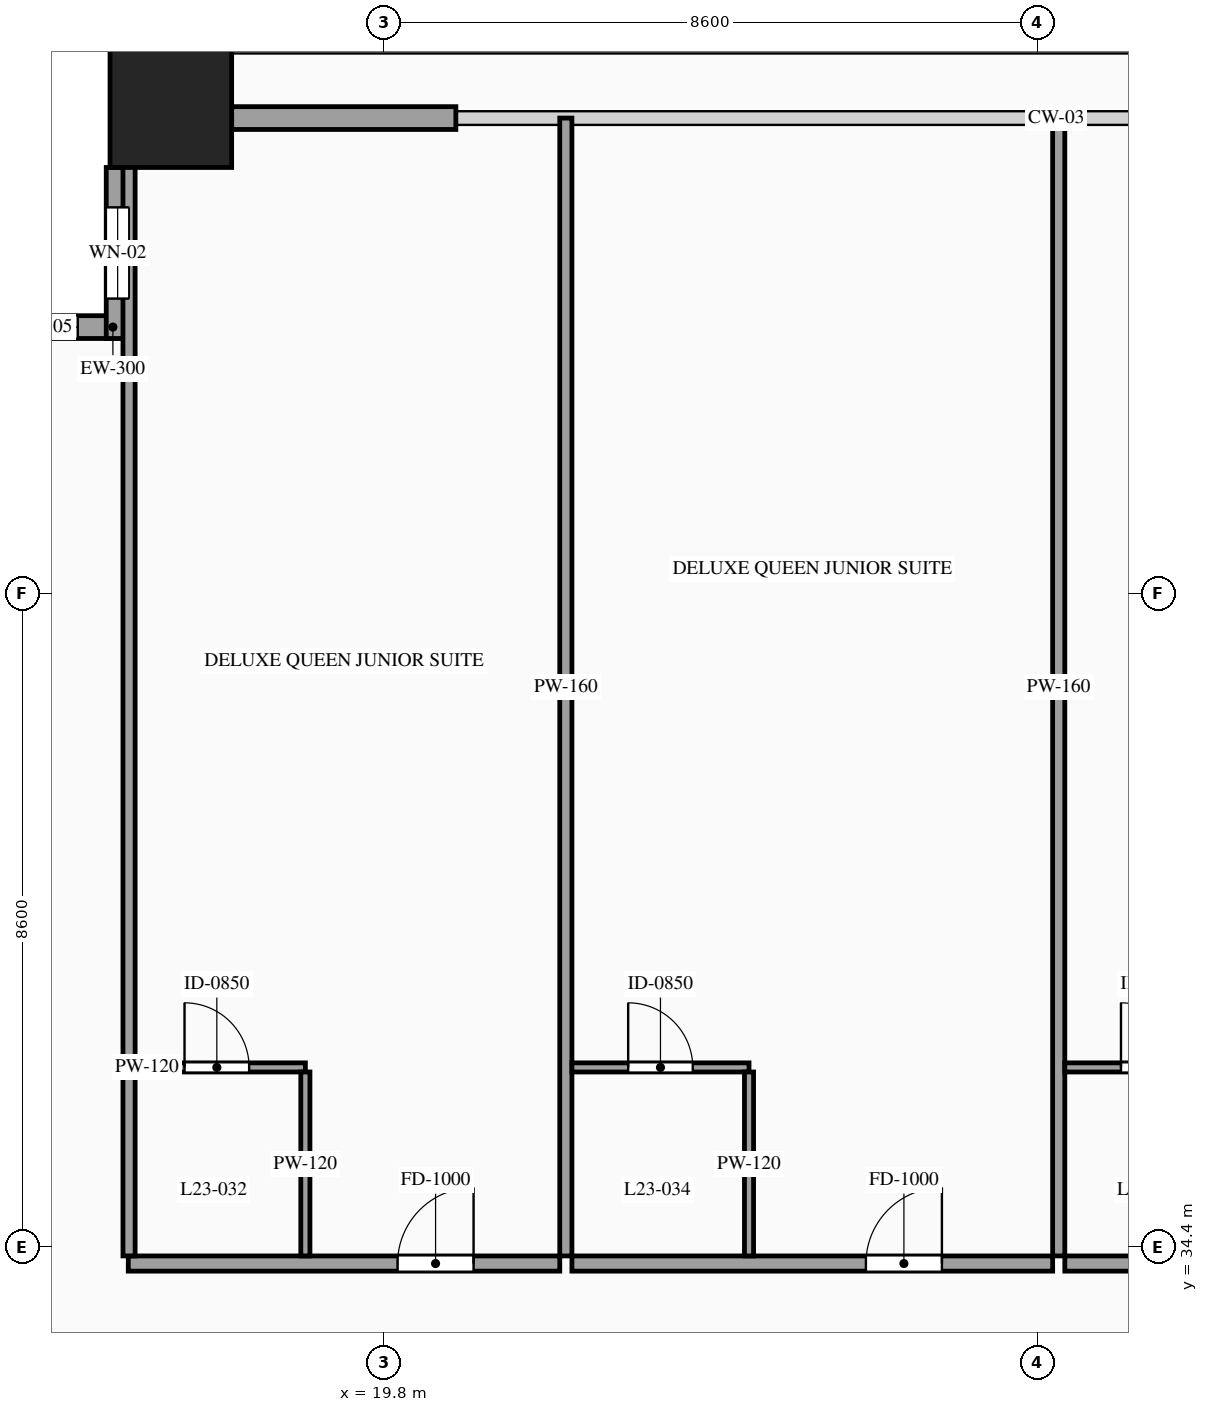
"""IFC4 building model, lengths in metres.
Left out: names, types, materials, properties, quantities, classifications, styles, units other than length and angle.
Written with IfcOpenShell. Run it as: python <this file> out.ifc"""

import sys

from ifc_helpers import new_model, si_unit, direction, frame, frame_2d, origin, origin_2d, place, context, subcontext, project, spatial, rectangle, hollow_rectangle, extrude, source, transform, mapped, element, fill, save


model = new_model("IFC4")
c1 = context("Model", 3, precision=1e-05, world=origin(), true_north=direction((0.0, 1.0)))
c2 = subcontext(c1, "Body", "Model", "MODEL_VIEW")
j1 = project(units=[si_unit("LENGTHUNIT", "METRE"), si_unit("PLANEANGLEUNIT", "RADIAN")], contexts=[c1])
p1 = place(None, origin())
s1 = spatial("IfcSite", under=j1, at=p1, CompositionType="ELEMENT")
p2 = place(p1, origin())
s2 = spatial("IfcBuilding", under=s1, at=p2, CompositionType="ELEMENT")
p3 = place(p2, frame((0.0, 0.0, 90.2)))
s3 = spatial("IfcBuildingStorey", under=s2, at=p3, CompositionType="ELEMENT", Elevation=90.2)
m1 = source(origin(), c2, "Body", "SweptSolid", [
    extrude(hollow_rectangle(XDim=1.6, YDim=1.6, WallThickness=0.07, at=origin_2d()), origin(), (0.0, 0.0, 1.0), 3.6),
])
p4 = place(p3, frame((17.0, 49.4, 0.0), z_axis=(0.0, 0.0, 1.0), x_axis=(1.0, 0.0, 0.0)))
e1 = element("IfcColumn", 1, at=p4, inside=s3, PredefinedType="COLUMN", context=c2, shape_type="MappedRepresentation", body=[
    mapped(m1, transform((0.0, 0.0, 0.0), scale=1.0)),
])
p5 = place(p3, frame((16.45, 46.5, 0.0), z_axis=(0.0, 0.0, 1.0), x_axis=(-1.0, 0.0, 0.0)))
e2 = element("IfcWall", 2, at=p5, inside=s3, PredefinedType="SOLIDWALL", context=c2, shape_type="SweptSolid", body=[
    extrude(rectangle(XDim=2.25, YDim=0.3, at=frame_2d((1.125, 0.0))), origin(), (0.0, 0.0, 1.0), 3.38),
])
p6 = place(p5, frame((0.675, 0.0, 0.85)))
e3 = element("IfcOpeningElement", 3, at=p6, cuts=e2, PredefinedType="OPENING", context=c2, shape_type="SweptSolid", body=[
    extrude(rectangle(XDim=0.9, YDim=1.5, at=frame_2d((0.45, 0.75))), frame((0.0, 0.165, 0.0), z_axis=(0.0, -1.0, 0.0), x_axis=(1.0, 0.0, 0.0)), (0.0, 0.0, 1.0), 0.33),
])
p7 = place(p3, frame((16.3, 48.6, 0.0), z_axis=(0.0, 0.0, 1.0), x_axis=(0.0, -1.0, 0.0)))
e4 = element("IfcWall", 4, at=p7, inside=s3, PredefinedType="SOLIDWALL", context=c2, shape_type="SweptSolid", body=[
    extrude(rectangle(XDim=2.25, YDim=0.3, at=frame_2d((1.125, 0.0))), origin(), (0.0, 0.0, 1.0), 3.38),
])
p8 = place(p7, frame((0.525, 0.0, 0.85)))
e5 = element("IfcOpeningElement", 5, at=p8, cuts=e4, PredefinedType="OPENING", context=c2, shape_type="SweptSolid", body=[
    extrude(rectangle(XDim=1.2, YDim=2.1, at=frame_2d((0.6, 1.05))), frame((0.0, 0.165, 0.0), z_axis=(0.0, -1.0, 0.0), x_axis=(1.0, 0.0, 0.0)), (0.0, 0.0, 1.0), 0.33),
])
m2 = source(origin(), c2, "Body", "SweptSolid", [
    extrude(rectangle(XDim=2.95, YDim=0.3, at=frame_2d((1.475, 0.0))), origin(), (0.0, 0.0, 1.0), 2.775),
])
p9 = place(p3, frame((17.8, 49.25, 0.0), z_axis=(0.0, 0.0, 1.0), x_axis=(1.0, 0.0, 0.0)))
e6 = element("IfcWall", 6, at=p9, inside=s3, PredefinedType="SOLIDWALL", context=c2, shape_type="MappedRepresentation", body=[
    mapped(m2, transform((0.0, 0.0, 0.0), scale=1.0)),
])
p10 = place(p3, frame((16.44, 34.18, 0.0), z_axis=(0.0, 0.0, 1.0), x_axis=(1.0, 0.0, 0.0)))
e7 = element("IfcWall", 7, at=p10, inside=s3, PredefinedType="PARTITIONING", context=c2, shape_type="SweptSolid", body=[
    extrude(rectangle(XDim=5.677, YDim=0.2, at=frame_2d((2.838, 0.0))), origin(), (0.0, 0.0, 1.0), 3.38),
])
p11 = place(p10, frame((3.543, 0.0, 0.0)))
e8 = element("IfcOpeningElement", 8, at=p11, cuts=e7, PredefinedType="OPENING", context=c2, shape_type="SweptSolid", body=[
    extrude(rectangle(XDim=1.0, YDim=2.2, at=frame_2d((0.5, 1.1))), frame((0.0, 0.115, 0.0), z_axis=(0.0, -1.0, 0.0), x_axis=(1.0, 0.0, 0.0)), (0.0, 0.0, 1.0), 0.23),
])
m3 = source(origin(), c2, "Body", "SweptSolid", [
    extrude(rectangle(XDim=14.97, YDim=0.16, at=frame_2d((7.485, 0.0))), origin(), (0.0, 0.0, 1.0), 3.38),
])
p12 = place(p3, frame((22.197, 34.28, 0.0), z_axis=(0.0, 0.0, 1.0), x_axis=(0.0, 1.0, 0.0)))
e9 = element("IfcWall", 9, at=p12, inside=s3, PredefinedType="PARTITIONING", context=c2, shape_type="MappedRepresentation", body=[
    mapped(m3, transform((0.0, 0.0, 0.0), scale=1.0)),
])
p13 = place(p3, frame((16.44, 36.76, 0.0), z_axis=(0.0, 0.0, 1.0), x_axis=(1.0, 0.0, 0.0)))
e10 = element("IfcWall", 10, at=p13, inside=s3, PredefinedType="PARTITIONING", context=c2, shape_type="SweptSolid", body=[
    extrude(rectangle(XDim=2.33, YDim=0.12, at=frame_2d((1.165, 0.0))), origin(), (0.0, 0.0, 1.0), 3.38),
])
p14 = place(p13, frame((0.74, 0.0, 0.0)))
e11 = element("IfcOpeningElement", 11, at=p14, cuts=e10, PredefinedType="OPENING", context=c2, shape_type="SweptSolid", body=[
    extrude(rectangle(XDim=0.85, YDim=2.1, at=frame_2d((0.425, 1.05))), frame((0.0, 0.075, 0.0), z_axis=(0.0, -1.0, 0.0), x_axis=(1.0, 0.0, 0.0)), (0.0, 0.0, 1.0), 0.15),
])
m4 = source(origin(), c2, "Body", "SweptSolid", [
    extrude(rectangle(XDim=2.42, YDim=0.12, at=frame_2d((1.21, 0.0))), origin(), (0.0, 0.0, 1.0), 3.38),
])
p15 = place(p3, frame((18.77, 34.28, 0.0), z_axis=(0.0, 0.0, 1.0), x_axis=(0.0, 1.0, 0.0)))
e12 = element("IfcWall", 12, at=p15, inside=s3, PredefinedType="PARTITIONING", context=c2, shape_type="MappedRepresentation", body=[
    mapped(m4, transform((0.0, 0.0, 0.0), scale=1.0)),
])
p16 = place(p3, frame((22.277, 34.18, 0.0), z_axis=(0.0, 0.0, 1.0), x_axis=(1.0, 0.0, 0.0)))
e13 = element("IfcWall", 13, at=p16, inside=s3, PredefinedType="PARTITIONING", context=c2, shape_type="SweptSolid", body=[
    extrude(rectangle(XDim=6.325, YDim=0.2, at=frame_2d((3.163, 0.0))), origin(), (0.0, 0.0, 1.0), 3.38),
])
p17 = place(p16, frame((3.868, 0.0, 0.0)))
e14 = element("IfcOpeningElement", 14, at=p17, cuts=e13, PredefinedType="OPENING", context=c2, shape_type="SweptSolid", body=[
    extrude(rectangle(XDim=1.0, YDim=2.2, at=frame_2d((0.5, 1.1))), frame((0.0, 0.115, 0.0), z_axis=(0.0, -1.0, 0.0), x_axis=(1.0, 0.0, 0.0)), (0.0, 0.0, 1.0), 0.23),
])
p18 = place(p3, frame((28.682, 34.28, 0.0), z_axis=(0.0, 0.0, 1.0), x_axis=(0.0, 1.0, 0.0)))
e15 = element("IfcWall", 15, at=p18, inside=s3, PredefinedType="PARTITIONING", context=c2, shape_type="MappedRepresentation", body=[
    mapped(m3, transform((0.0, 0.0, 0.0), scale=1.0)),
])
p19 = place(p3, frame((22.277, 36.76, 0.0), z_axis=(0.0, 0.0, 1.0), x_axis=(1.0, 0.0, 0.0)))
e16 = element("IfcWall", 16, at=p19, inside=s3, PredefinedType="PARTITIONING", context=c2, shape_type="SweptSolid", body=[
    extrude(rectangle(XDim=2.33, YDim=0.12, at=frame_2d((1.165, 0.0))), origin(), (0.0, 0.0, 1.0), 3.38),
])
p20 = place(p19, frame((0.74, 0.0, 0.0)))
e17 = element("IfcOpeningElement", 17, at=p20, cuts=e16, PredefinedType="OPENING", context=c2, shape_type="SweptSolid", body=[
    extrude(rectangle(XDim=0.85, YDim=2.1, at=frame_2d((0.425, 1.05))), frame((0.0, 0.075, 0.0), z_axis=(0.0, -1.0, 0.0), x_axis=(1.0, 0.0, 0.0)), (0.0, 0.0, 1.0), 0.15),
])
p21 = place(p3, frame((24.607, 34.28, 0.0), z_axis=(0.0, 0.0, 1.0), x_axis=(0.0, 1.0, 0.0)))
e18 = element("IfcWall", 18, at=p21, inside=s3, PredefinedType="PARTITIONING", context=c2, shape_type="MappedRepresentation", body=[
    mapped(m4, transform((0.0, 0.0, 0.0), scale=1.0)),
])
p22 = place(p3, frame((28.762, 34.18, 0.0), z_axis=(0.0, 0.0, 1.0), x_axis=(1.0, 0.0, 0.0)))
e19 = element("IfcWall", 19, at=p22, inside=s3, PredefinedType="PARTITIONING", context=c2, shape_type="SweptSolid", body=[
    extrude(rectangle(XDim=4.398, YDim=0.2, at=frame_2d((2.199, 0.0))), origin(), (0.0, 0.0, 1.0), 3.38),
])
p23 = place(p22, frame((2.903, 0.0, 0.0)))
e20 = element("IfcOpeningElement", 20, at=p23, cuts=e19, PredefinedType="OPENING", context=c2, shape_type="SweptSolid", body=[
    extrude(rectangle(XDim=1.0, YDim=2.2, at=frame_2d((0.5, 1.1))), frame((0.0, 0.115, 0.0), z_axis=(0.0, -1.0, 0.0), x_axis=(1.0, 0.0, 0.0)), (0.0, 0.0, 1.0), 0.23),
])
p24 = place(p3, frame((28.762, 36.76, 0.0), z_axis=(0.0, 0.0, 1.0), x_axis=(1.0, 0.0, 0.0)))
e21 = element("IfcWall", 21, at=p24, inside=s3, PredefinedType="PARTITIONING", context=c2, shape_type="SweptSolid", body=[
    extrude(rectangle(XDim=2.328, YDim=0.12, at=frame_2d((1.164, 0.0))), origin(), (0.0, 0.0, 1.0), 3.38),
])
p25 = place(p24, frame((0.739, 0.0, 0.0)))
e22 = element("IfcOpeningElement", 22, at=p25, cuts=e21, PredefinedType="OPENING", context=c2, shape_type="SweptSolid", body=[
    extrude(rectangle(XDim=0.85, YDim=2.1, at=frame_2d((0.425, 1.05))), frame((0.0, 0.075, 0.0), z_axis=(0.0, -1.0, 0.0), x_axis=(1.0, 0.0, 0.0)), (0.0, 0.0, 1.0), 0.15),
])
m5 = source(origin(), c2, "Body", "SweptSolid", [
    extrude(rectangle(XDim=14.82, YDim=0.16, at=frame_2d((7.41, 0.0))), origin(), (0.0, 0.0, 1.0), 3.38),
])
p26 = place(p3, frame((16.45, 34.28, 0.0), z_axis=(0.0, 0.0, 1.0), x_axis=(0.0, 1.0, 0.0)))
e23 = element("IfcWall", 23, at=p26, inside=s3, PredefinedType="PARTITIONING", context=c2, shape_type="MappedRepresentation", body=[
    mapped(m5, transform((0.0, 0.0, 0.0), scale=1.0)),
])
m6 = source(origin(), c2, "Body", "SweptSolid", [
    extrude(rectangle(XDim=0.9, YDim=1.5, at=frame_2d((0.45, 0.75))), frame((0.0, 0.03, 0.0), z_axis=(0.0, -1.0, 0.0), x_axis=(1.0, 0.0, 0.0)), (0.0, 0.0, 1.0), 0.06),
])
p27 = place(p6, origin())
e24 = element("IfcWindow", 24, at=p27, inside=s3, PartitioningType="SINGLE_PANEL", PredefinedType="WINDOW", context=c2, shape_type="MappedRepresentation", body=[
    mapped(m6, transform((0.0, 0.0, 0.0), scale=1.0)),
])
fill(e3, e24)
m7 = source(origin(), c2, "Body", "SweptSolid", [
    extrude(rectangle(XDim=1.2, YDim=2.1, at=frame_2d((0.6, 1.05))), frame((0.0, 0.03, 0.0), z_axis=(0.0, -1.0, 0.0), x_axis=(1.0, 0.0, 0.0)), (0.0, 0.0, 1.0), 0.06),
])
p28 = place(p8, origin())
e25 = element("IfcWindow", 25, at=p28, inside=s3, PartitioningType="SINGLE_PANEL", PredefinedType="WINDOW", context=c2, shape_type="MappedRepresentation", body=[
    mapped(m7, transform((0.0, 0.0, 0.0), scale=1.0)),
])
fill(e5, e25)
m8 = source(origin(), c2, "Body", "SweptSolid", [
    extrude(rectangle(XDim=1.0, YDim=2.2, at=frame_2d((0.5, 1.1))), frame((0.0, 0.025, 0.0), z_axis=(0.0, -1.0, 0.0), x_axis=(1.0, 0.0, 0.0)), (0.0, 0.0, 1.0), 0.05),
])
p29 = place(p11, origin())
e26 = element("IfcDoor", 26, at=p29, inside=s3, OperationType="SINGLE_SWING_RIGHT", PredefinedType="DOOR", context=c2, shape_type="MappedRepresentation", body=[
    mapped(m8, transform((0.0, 0.0, 0.0), scale=1.0)),
])
fill(e8, e26)
m9 = source(origin(), c2, "Body", "SweptSolid", [
    extrude(rectangle(XDim=0.85, YDim=2.1, at=frame_2d((0.425, 1.05))), frame((0.0, 0.025, 0.0), z_axis=(0.0, -1.0, 0.0), x_axis=(1.0, 0.0, 0.0)), (0.0, 0.0, 1.0), 0.05),
])
p30 = place(p14, origin())
e27 = element("IfcDoor", 27, at=p30, inside=s3, OperationType="SINGLE_SWING_LEFT", PredefinedType="DOOR", context=c2, shape_type="MappedRepresentation", body=[
    mapped(m9, transform((0.0, 0.0, 0.0), scale=1.0)),
])
fill(e11, e27)
p31 = place(p17, origin())
e28 = element("IfcDoor", 28, at=p31, inside=s3, OperationType="SINGLE_SWING_RIGHT", PredefinedType="DOOR", context=c2, shape_type="MappedRepresentation", body=[
    mapped(m8, transform((0.0, 0.0, 0.0), scale=1.0)),
])
fill(e14, e28)
p32 = place(p20, origin())
e29 = element("IfcDoor", 29, at=p32, inside=s3, OperationType="SINGLE_SWING_LEFT", PredefinedType="DOOR", context=c2, shape_type="MappedRepresentation", body=[
    mapped(m9, transform((0.0, 0.0, 0.0), scale=1.0)),
])
fill(e17, e29)
p33 = place(p25, origin())
e30 = element("IfcDoor", 30, at=p33, inside=s3, OperationType="SINGLE_SWING_LEFT", PredefinedType="DOOR", context=c2, shape_type="MappedRepresentation", body=[
    mapped(m9, transform((0.0, 0.0, 0.0), scale=1.0)),
])
fill(e22, e30)
save(model, sys.argv[1])
